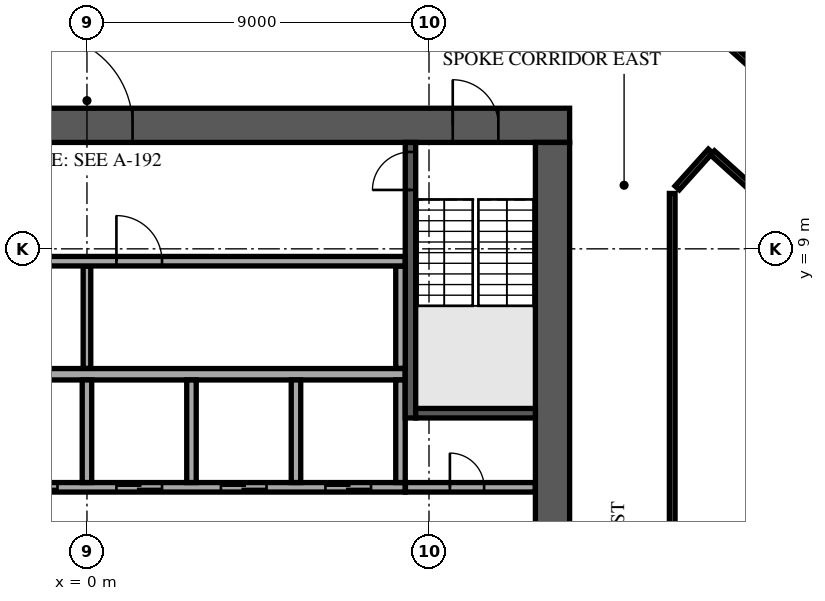
"""IFC4 building model, lengths in metres.
Left out: names, types, materials, properties, quantities, classifications, styles, units other than length and angle.
Written with IfcOpenShell. Run it as: python <this file> out.ifc"""

import sys

from ifc_helpers import new_model, si_unit, direction, frame, frame_2d, origin, place, context, subcontext, project, spatial, rectangle, extrude, element, fill, save


model = new_model("IFC4")
c1 = context("Model", 3, precision=1e-05, world=origin(), true_north=direction((0.0, 1.0)))
c2 = subcontext(c1, "Body", "Model", "MODEL_VIEW")
j1 = project(units=[si_unit("LENGTHUNIT", "METRE"), si_unit("PLANEANGLEUNIT", "RADIAN")], contexts=[c1])
p1 = place(None, origin())
s1 = spatial("IfcSite", under=j1, at=p1, CompositionType="ELEMENT")
p2 = place(p1, origin())
s2 = spatial("IfcBuilding", under=s1, at=p2, CompositionType="ELEMENT")
p3 = place(p2, frame((0.0, 0.0, 217.3)))
s3 = spatial("IfcBuildingStorey", under=s2, at=p3, CompositionType="ELEMENT", Elevation=217.3)
p4 = place(p3, frame((-12.7, 12.25, 0.0), z_axis=(0.0, 0.0, 1.0), x_axis=(1.0, 0.0, 0.0)))
e1 = element("IfcWall", 1, at=p4, inside=s3, PredefinedType="SHEAR", context=c2, shape_type="SweptSolid", body=[
    extrude(rectangle(XDim=25.4, YDim=0.9, at=frame_2d((12.7, 0.0))), origin(), (0.0, 0.0, 1.0), 3.62),
])
p5 = place(p4, frame((11.5, 0.0, 0.0)))
e2 = element("IfcOpeningElement", 2, at=p5, cuts=e1, PredefinedType="OPENING", context=c2, shape_type="SweptSolid", body=[
    extrude(rectangle(XDim=2.4, YDim=2.4, at=frame_2d((1.2, 1.2))), frame((0.0, 0.46, 0.0), z_axis=(0.0, -1.0, 0.0), x_axis=(1.0, 0.0, 0.0)), (0.0, 0.0, 1.0), 0.92),
])
p6 = place(p4, frame((22.325, 0.0, 0.0)))
e3 = element("IfcOpeningElement", 3, at=p6, cuts=e1, PredefinedType="OPENING", context=c2, shape_type="SweptSolid", body=[
    extrude(rectangle(XDim=1.2, YDim=2.1, at=frame_2d((0.6, 1.05))), frame((0.0, 0.46, 0.0), z_axis=(0.0, -1.0, 0.0), x_axis=(1.0, 0.0, 0.0)), (0.0, 0.0, 1.0), 0.92),
])
p7 = place(p4, frame((1.3, 0.0, 0.0)))
e4 = element("IfcOpeningElement", 4, at=p7, cuts=e1, PredefinedType="OPENING", context=c2, shape_type="SweptSolid", body=[
    extrude(rectangle(XDim=1.0, YDim=2.1, at=frame_2d((0.5, 1.05))), frame((0.0, 0.46, 0.0), z_axis=(0.0, -1.0, 0.0), x_axis=(1.0, 0.0, 0.0)), (0.0, 0.0, 1.0), 0.92),
])
p8 = place(p3, frame((12.25, -11.8, 0.0), z_axis=(0.0, 0.0, 1.0), x_axis=(0.0, 1.0, 0.0)))
e5 = element("IfcWall", 5, at=p8, inside=s3, PredefinedType="SHEAR", context=c2, shape_type="SweptSolid", body=[
    extrude(rectangle(XDim=23.6, YDim=0.9, at=frame_2d((11.8, 0.0))), origin(), (0.0, 0.0, 1.0), 3.62),
])
p9 = place(p8, frame((10.6, 0.0, 0.0)))
e6 = element("IfcOpeningElement", 6, at=p9, cuts=e5, PredefinedType="OPENING", context=c2, shape_type="SweptSolid", body=[
    extrude(rectangle(XDim=2.4, YDim=2.4, at=frame_2d((1.2, 1.2))), frame((0.0, 0.46, 0.0), z_axis=(0.0, -1.0, 0.0), x_axis=(1.0, 0.0, 0.0)), (0.0, 0.0, 1.0), 0.92),
])
p10 = place(p3, frame((-8.375, 5.7, 0.0), z_axis=(0.0, 0.0, 1.0), x_axis=(1.0, 0.0, 0.0)))
e7 = element("IfcWall", 7, at=p10, inside=s3, PredefinedType="SOLIDWALL", context=c2, shape_type="SweptSolid", body=[
    extrude(rectangle(XDim=16.75, YDim=0.3, at=frame_2d((8.375, 0.0))), origin(), (0.0, 0.0, 1.0), 3.62),
])
p11 = place(p3, frame((-8.375, 2.725, 0.0), z_axis=(0.0, 0.0, 1.0), x_axis=(1.0, 0.0, 0.0)))
e8 = element("IfcWall", 8, at=p11, inside=s3, PredefinedType="SOLIDWALL", context=c2, shape_type="SweptSolid", body=[
    extrude(rectangle(XDim=16.75, YDim=0.25, at=frame_2d((8.375, 0.0))), origin(), (0.0, 0.0, 1.0), 3.62),
])
p12 = place(p11, frame((0.9, 0.0, 0.0)))
e9 = element("IfcOpeningElement", 9, at=p12, cuts=e8, PredefinedType="OPENING", context=c2, shape_type="SweptSolid", body=[
    extrude(rectangle(XDim=1.2, YDim=2.1, at=frame_2d((0.6, 1.05))), frame((0.0, 0.135, 0.0), z_axis=(0.0, -1.0, 0.0), x_axis=(1.0, 0.0, 0.0)), (0.0, 0.0, 1.0), 0.27),
])
p13 = place(p11, frame((3.65, 0.0, 0.0)))
e10 = element("IfcOpeningElement", 10, at=p13, cuts=e8, PredefinedType="OPENING", context=c2, shape_type="SweptSolid", body=[
    extrude(rectangle(XDim=1.2, YDim=2.1, at=frame_2d((0.6, 1.05))), frame((0.0, 0.135, 0.0), z_axis=(0.0, -1.0, 0.0), x_axis=(1.0, 0.0, 0.0)), (0.0, 0.0, 1.0), 0.27),
])
p14 = place(p11, frame((6.4, 0.0, 0.0)))
e11 = element("IfcOpeningElement", 11, at=p14, cuts=e8, PredefinedType="OPENING", context=c2, shape_type="SweptSolid", body=[
    extrude(rectangle(XDim=1.2, YDim=2.1, at=frame_2d((0.6, 1.05))), frame((0.0, 0.135, 0.0), z_axis=(0.0, -1.0, 0.0), x_axis=(1.0, 0.0, 0.0)), (0.0, 0.0, 1.0), 0.27),
])
p15 = place(p11, frame((9.15, 0.0, 0.0)))
e12 = element("IfcOpeningElement", 12, at=p15, cuts=e8, PredefinedType="OPENING", context=c2, shape_type="SweptSolid", body=[
    extrude(rectangle(XDim=1.2, YDim=2.1, at=frame_2d((0.6, 1.05))), frame((0.0, 0.135, 0.0), z_axis=(0.0, -1.0, 0.0), x_axis=(1.0, 0.0, 0.0)), (0.0, 0.0, 1.0), 0.27),
])
p16 = place(p11, frame((11.9, 0.0, 0.0)))
e13 = element("IfcOpeningElement", 13, at=p16, cuts=e8, PredefinedType="OPENING", context=c2, shape_type="SweptSolid", body=[
    extrude(rectangle(XDim=1.2, YDim=2.1, at=frame_2d((0.6, 1.05))), frame((0.0, 0.135, 0.0), z_axis=(0.0, -1.0, 0.0), x_axis=(1.0, 0.0, 0.0)), (0.0, 0.0, 1.0), 0.27),
])
p17 = place(p11, frame((14.65, 0.0, 0.0)))
e14 = element("IfcOpeningElement", 14, at=p17, cuts=e8, PredefinedType="OPENING", context=c2, shape_type="SweptSolid", body=[
    extrude(rectangle(XDim=1.2, YDim=2.1, at=frame_2d((0.6, 1.05))), frame((0.0, 0.135, 0.0), z_axis=(0.0, -1.0, 0.0), x_axis=(1.0, 0.0, 0.0)), (0.0, 0.0, 1.0), 0.27),
])
for number, where, z_axis, x_axis in (
    (15, (0.0, 2.85, 0.0), (0.0, 0.0, 1.0), (0.0, 1.0, 0.0)),
    (16, (2.75, 2.85, 0.0), (0.0, 0.0, 1.0), (0.0, 1.0, 0.0)),
    (17, (5.5, 2.85, 0.0), (0.0, 0.0, 1.0), (0.0, 1.0, 0.0)),
    (18, (8.25, 2.85, 0.0), (0.0, 0.0, 1.0), (0.0, 1.0, 0.0)),
):
    element("IfcWall", number, at=place(p3, frame(where, z_axis=z_axis, x_axis=x_axis)), inside=s3, PredefinedType="SOLIDWALL", context=c2, shape_type="SweptSolid", body=[
        extrude(rectangle(XDim=2.7, YDim=0.25, at=frame_2d((1.35, 0.0))), origin(), (0.0, 0.0, 1.0), 3.62),
    ])
p18 = place(p3, frame((8.512, 4.55, 0.0), z_axis=(0.0, 0.0, 1.0), x_axis=(0.0, 1.0, 0.0)))
e19 = element("IfcWall", 19, at=p18, inside=s3, PredefinedType="SOLIDWALL", context=c2, shape_type="SweptSolid", body=[
    extrude(rectangle(XDim=7.25, YDim=0.275, at=frame_2d((3.625, 0.0))), origin(), (0.0, 0.0, 1.0), 3.62),
])
p19 = place(p18, frame((6.0, 0.0, 0.0)))
e20 = element("IfcOpeningElement", 20, at=p19, cuts=e19, PredefinedType="OPENING", context=c2, shape_type="SweptSolid", body=[
    extrude(rectangle(XDim=1.0, YDim=2.1, at=frame_2d((0.5, 1.05))), frame((0.0, 0.147, 0.0), z_axis=(0.0, -1.0, 0.0), x_axis=(1.0, 0.0, 0.0)), (0.0, 0.0, 1.0), 0.295),
])
p20 = place(p3, frame((8.65, 4.675, 0.0), z_axis=(0.0, 0.0, 1.0), x_axis=(1.0, 0.0, 0.0)))
e21 = element("IfcWall", 21, at=p20, inside=s3, PredefinedType="SOLIDWALL", context=c2, shape_type="SweptSolid", body=[
    extrude(rectangle(XDim=3.15, YDim=0.25, at=frame_2d((1.575, 0.0))), origin(), (0.0, 0.0, 1.0), 3.62),
])
p21 = place(p3, frame((8.38, 2.725, 0.0), z_axis=(0.0, 0.0, 1.0), x_axis=(1.0, 0.0, 0.0)))
e22 = element("IfcWall", 22, at=p21, inside=s3, PredefinedType="PARTITIONING", context=c2, shape_type="SweptSolid", body=[
    extrude(rectangle(XDim=3.415, YDim=0.25, at=frame_2d((1.708, 0.0))), origin(), (0.0, 0.0, 1.0), 3.62),
])
p22 = place(p21, frame((1.17, 0.0, 0.0)))
e23 = element("IfcOpeningElement", 23, at=p22, cuts=e22, PredefinedType="OPENING", context=c2, shape_type="SweptSolid", body=[
    extrude(rectangle(XDim=0.9, YDim=2.1, at=frame_2d((0.45, 1.05))), frame((0.0, 0.135, 0.0), z_axis=(0.0, -1.0, 0.0), x_axis=(1.0, 0.0, 0.0)), (0.0, 0.0, 1.0), 0.27),
])
p23 = place(p3, frame((0.0, 5.855, 0.0), z_axis=(0.0, 0.0, 1.0), x_axis=(0.0, 1.0, 0.0)))
e24 = element("IfcWall", 24, at=p23, inside=s3, PredefinedType="PARTITIONING", context=c2, shape_type="SweptSolid", body=[
    extrude(rectangle(XDim=2.69, YDim=0.2, at=frame_2d((1.345, 0.0))), origin(), (0.0, 0.0, 1.0), 3.62),
])
p24 = place(p3, frame((8.25, 5.855, 0.0), z_axis=(0.0, 0.0, 1.0), x_axis=(0.0, 1.0, 0.0)))
e25 = element("IfcWall", 25, at=p24, inside=s3, PredefinedType="PARTITIONING", context=c2, shape_type="SweptSolid", body=[
    extrude(rectangle(XDim=2.69, YDim=0.25, at=frame_2d((1.345, 0.0))), origin(), (0.0, 0.0, 1.0), 3.62),
])
p25 = place(p3, frame((-8.35, 8.675, 0.0), z_axis=(0.0, 0.0, 1.0), x_axis=(1.0, 0.0, 0.0)))
e26 = element("IfcWall", 26, at=p25, inside=s3, PredefinedType="PARTITIONING", context=c2, shape_type="SweptSolid", body=[
    extrude(rectangle(XDim=16.72, YDim=0.25, at=frame_2d((8.36, 0.0))), origin(), (0.0, 0.0, 1.0), 3.62),
])
p26 = place(p25, frame((0.875, 0.0, 0.0)))
e27 = element("IfcOpeningElement", 27, at=p26, cuts=e26, PredefinedType="OPENING", context=c2, shape_type="SweptSolid", body=[
    extrude(rectangle(XDim=1.2, YDim=2.1, at=frame_2d((0.6, 1.05))), frame((0.0, 0.135, 0.0), z_axis=(0.0, -1.0, 0.0), x_axis=(1.0, 0.0, 0.0)), (0.0, 0.0, 1.0), 0.27),
])
p27 = place(p25, frame((9.125, 0.0, 0.0)))
e28 = element("IfcOpeningElement", 28, at=p27, cuts=e26, PredefinedType="OPENING", context=c2, shape_type="SweptSolid", body=[
    extrude(rectangle(XDim=1.2, YDim=2.1, at=frame_2d((0.6, 1.05))), frame((0.0, 0.135, 0.0), z_axis=(0.0, -1.0, 0.0), x_axis=(1.0, 0.0, 0.0)), (0.0, 0.0, 1.0), 0.27),
])
p28 = place(p3, frame((1.962, -34.735, 0.0), z_axis=(0.0, 0.0, 1.0), x_axis=(0.669133181838, 0.743142506497, 0.0)))
e29 = element("IfcWall", 29, at=p28, inside=s3, PredefinedType="STANDARD", context=c2, shape_type="SweptSolid", body=[
    extrude(rectangle(XDim=49.0, YDim=0.6, at=frame_2d((24.5, 0.0))), origin(), (0.0, 0.0, 1.0), 3.62),
])
p29 = place(p28, frame((1.227, 0.0, 0.9)))
e30 = element("IfcOpeningElement", 30, at=p29, cuts=e29, PredefinedType="OPENING", context=c2, shape_type="SweptSolid", body=[
    extrude(rectangle(XDim=2.0, YDim=2.1, at=frame_2d((1.0, 1.05))), frame((0.0, 0.31, 0.0), z_axis=(0.0, -1.0, 0.0), x_axis=(1.0, 0.0, 0.0)), (0.0, 0.0, 1.0), 0.62),
])
p30 = place(p28, frame((5.682, 0.0, 0.9)))
e31 = element("IfcOpeningElement", 31, at=p30, cuts=e29, PredefinedType="OPENING", context=c2, shape_type="SweptSolid", body=[
    extrude(rectangle(XDim=2.0, YDim=2.1, at=frame_2d((1.0, 1.05))), frame((0.0, 0.31, 0.0), z_axis=(0.0, -1.0, 0.0), x_axis=(1.0, 0.0, 0.0)), (0.0, 0.0, 1.0), 0.62),
])
p31 = place(p28, frame((10.136, 0.0, 0.9)))
e32 = element("IfcOpeningElement", 32, at=p31, cuts=e29, PredefinedType="OPENING", context=c2, shape_type="SweptSolid", body=[
    extrude(rectangle(XDim=2.0, YDim=2.1, at=frame_2d((1.0, 1.05))), frame((0.0, 0.31, 0.0), z_axis=(0.0, -1.0, 0.0), x_axis=(1.0, 0.0, 0.0)), (0.0, 0.0, 1.0), 0.62),
])
p32 = place(p28, frame((14.591, 0.0, 0.9)))
e33 = element("IfcOpeningElement", 33, at=p32, cuts=e29, PredefinedType="OPENING", context=c2, shape_type="SweptSolid", body=[
    extrude(rectangle(XDim=2.0, YDim=2.1, at=frame_2d((1.0, 1.05))), frame((0.0, 0.31, 0.0), z_axis=(0.0, -1.0, 0.0), x_axis=(1.0, 0.0, 0.0)), (0.0, 0.0, 1.0), 0.62),
])
p33 = place(p28, frame((19.045, 0.0, 0.9)))
e34 = element("IfcOpeningElement", 34, at=p33, cuts=e29, PredefinedType="OPENING", context=c2, shape_type="SweptSolid", body=[
    extrude(rectangle(XDim=2.0, YDim=2.1, at=frame_2d((1.0, 1.05))), frame((0.0, 0.31, 0.0), z_axis=(0.0, -1.0, 0.0), x_axis=(1.0, 0.0, 0.0)), (0.0, 0.0, 1.0), 0.62),
])
p34 = place(p28, frame((23.5, 0.0, 0.9)))
e35 = element("IfcOpeningElement", 35, at=p34, cuts=e29, PredefinedType="OPENING", context=c2, shape_type="SweptSolid", body=[
    extrude(rectangle(XDim=2.0, YDim=2.1, at=frame_2d((1.0, 1.05))), frame((0.0, 0.31, 0.0), z_axis=(0.0, -1.0, 0.0), x_axis=(1.0, 0.0, 0.0)), (0.0, 0.0, 1.0), 0.62),
])
p35 = place(p28, frame((27.955, 0.0, 0.9)))
e36 = element("IfcOpeningElement", 36, at=p35, cuts=e29, PredefinedType="OPENING", context=c2, shape_type="SweptSolid", body=[
    extrude(rectangle(XDim=2.0, YDim=2.1, at=frame_2d((1.0, 1.05))), frame((0.0, 0.31, 0.0), z_axis=(0.0, -1.0, 0.0), x_axis=(1.0, 0.0, 0.0)), (0.0, 0.0, 1.0), 0.62),
])
p36 = place(p28, frame((32.409, 0.0, 0.9)))
e37 = element("IfcOpeningElement", 37, at=p36, cuts=e29, PredefinedType="OPENING", context=c2, shape_type="SweptSolid", body=[
    extrude(rectangle(XDim=2.0, YDim=2.1, at=frame_2d((1.0, 1.05))), frame((0.0, 0.31, 0.0), z_axis=(0.0, -1.0, 0.0), x_axis=(1.0, 0.0, 0.0)), (0.0, 0.0, 1.0), 0.62),
])
p37 = place(p28, frame((36.864, 0.0, 0.9)))
e38 = element("IfcOpeningElement", 38, at=p37, cuts=e29, PredefinedType="OPENING", context=c2, shape_type="SweptSolid", body=[
    extrude(rectangle(XDim=2.0, YDim=2.1, at=frame_2d((1.0, 1.05))), frame((0.0, 0.31, 0.0), z_axis=(0.0, -1.0, 0.0), x_axis=(1.0, 0.0, 0.0)), (0.0, 0.0, 1.0), 0.62),
])
p38 = place(p28, frame((41.318, 0.0, 0.9)))
e39 = element("IfcOpeningElement", 39, at=p38, cuts=e29, PredefinedType="OPENING", context=c2, shape_type="SweptSolid", body=[
    extrude(rectangle(XDim=2.0, YDim=2.1, at=frame_2d((1.0, 1.05))), frame((0.0, 0.31, 0.0), z_axis=(0.0, -1.0, 0.0), x_axis=(1.0, 0.0, 0.0)), (0.0, 0.0, 1.0), 0.62),
])
p39 = place(p28, frame((45.773, 0.0, 0.9)))
e40 = element("IfcOpeningElement", 40, at=p39, cuts=e29, PredefinedType="OPENING", context=c2, shape_type="SweptSolid", body=[
    extrude(rectangle(XDim=2.0, YDim=2.1, at=frame_2d((1.0, 1.05))), frame((0.0, 0.31, 0.0), z_axis=(0.0, -1.0, 0.0), x_axis=(1.0, 0.0, 0.0)), (0.0, 0.0, 1.0), 0.62),
])
p40 = place(p3, frame((34.365, 9.023, 0.0), z_axis=(0.0, 0.0, 1.0), x_axis=(-0.743146896498, 0.66912830625, 0.0)))
e41 = element("IfcWall", 41, at=p40, inside=s3, PredefinedType="STANDARD", context=c2, shape_type="SweptSolid", body=[
    extrude(rectangle(XDim=39.0, YDim=0.6, at=frame_2d((19.5, 0.0))), origin(), (0.0, 0.0, 1.0), 3.62),
])
p41 = place(p40, frame((1.217, 0.0, 0.9)))
e42 = element("IfcOpeningElement", 42, at=p41, cuts=e41, PredefinedType="OPENING", context=c2, shape_type="SweptSolid", body=[
    extrude(rectangle(XDim=1.9, YDim=2.1, at=frame_2d((0.95, 1.05))), frame((0.0, 0.31, 0.0), z_axis=(0.0, -1.0, 0.0), x_axis=(1.0, 0.0, 0.0)), (0.0, 0.0, 1.0), 0.62),
])
p42 = place(p40, frame((5.55, 0.0, 0.9)))
e43 = element("IfcOpeningElement", 43, at=p42, cuts=e41, PredefinedType="OPENING", context=c2, shape_type="SweptSolid", body=[
    extrude(rectangle(XDim=1.9, YDim=2.1, at=frame_2d((0.95, 1.05))), frame((0.0, 0.31, 0.0), z_axis=(0.0, -1.0, 0.0), x_axis=(1.0, 0.0, 0.0)), (0.0, 0.0, 1.0), 0.62),
])
p43 = place(p40, frame((9.883, 0.0, 0.9)))
e44 = element("IfcOpeningElement", 44, at=p43, cuts=e41, PredefinedType="OPENING", context=c2, shape_type="SweptSolid", body=[
    extrude(rectangle(XDim=1.9, YDim=2.1, at=frame_2d((0.95, 1.05))), frame((0.0, 0.31, 0.0), z_axis=(0.0, -1.0, 0.0), x_axis=(1.0, 0.0, 0.0)), (0.0, 0.0, 1.0), 0.62),
])
p44 = place(p40, frame((14.217, 0.0, 0.9)))
e45 = element("IfcOpeningElement", 45, at=p44, cuts=e41, PredefinedType="OPENING", context=c2, shape_type="SweptSolid", body=[
    extrude(rectangle(XDim=1.9, YDim=2.1, at=frame_2d((0.95, 1.05))), frame((0.0, 0.31, 0.0), z_axis=(0.0, -1.0, 0.0), x_axis=(1.0, 0.0, 0.0)), (0.0, 0.0, 1.0), 0.62),
])
p45 = place(p40, frame((18.55, 0.0, 0.9)))
e46 = element("IfcOpeningElement", 46, at=p45, cuts=e41, PredefinedType="OPENING", context=c2, shape_type="SweptSolid", body=[
    extrude(rectangle(XDim=1.9, YDim=2.1, at=frame_2d((0.95, 1.05))), frame((0.0, 0.31, 0.0), z_axis=(0.0, -1.0, 0.0), x_axis=(1.0, 0.0, 0.0)), (0.0, 0.0, 1.0), 0.62),
])
p46 = place(p40, frame((22.883, 0.0, 0.9)))
e47 = element("IfcOpeningElement", 47, at=p46, cuts=e41, PredefinedType="OPENING", context=c2, shape_type="SweptSolid", body=[
    extrude(rectangle(XDim=1.9, YDim=2.1, at=frame_2d((0.95, 1.05))), frame((0.0, 0.31, 0.0), z_axis=(0.0, -1.0, 0.0), x_axis=(1.0, 0.0, 0.0)), (0.0, 0.0, 1.0), 0.62),
])
p47 = place(p40, frame((27.217, 0.0, 0.9)))
e48 = element("IfcOpeningElement", 48, at=p47, cuts=e41, PredefinedType="OPENING", context=c2, shape_type="SweptSolid", body=[
    extrude(rectangle(XDim=1.9, YDim=2.1, at=frame_2d((0.95, 1.05))), frame((0.0, 0.31, 0.0), z_axis=(0.0, -1.0, 0.0), x_axis=(1.0, 0.0, 0.0)), (0.0, 0.0, 1.0), 0.62),
])
p48 = place(p40, frame((31.55, 0.0, 0.9)))
e49 = element("IfcOpeningElement", 49, at=p48, cuts=e41, PredefinedType="OPENING", context=c2, shape_type="SweptSolid", body=[
    extrude(rectangle(XDim=1.9, YDim=2.1, at=frame_2d((0.95, 1.05))), frame((0.0, 0.31, 0.0), z_axis=(0.0, -1.0, 0.0), x_axis=(1.0, 0.0, 0.0)), (0.0, 0.0, 1.0), 0.62),
])
p49 = place(p40, frame((35.883, 0.0, 0.9)))
e50 = element("IfcOpeningElement", 50, at=p49, cuts=e41, PredefinedType="OPENING", context=c2, shape_type="SweptSolid", body=[
    extrude(rectangle(XDim=1.9, YDim=2.1, at=frame_2d((0.95, 1.05))), frame((0.0, 0.31, 0.0), z_axis=(0.0, -1.0, 0.0), x_axis=(1.0, 0.0, 0.0)), (0.0, 0.0, 1.0), 0.62),
])
p50 = place(p3, frame((5.128, 24.958, 0.0), z_axis=(0.0, 0.0, 1.0), x_axis=(0.743144813636, -0.66913061951, 0.0)))
e51 = element("IfcWall", 51, at=p50, inside=s3, PredefinedType="PARTITIONING", context=c2, shape_type="SweptSolid", body=[
    extrude(rectangle(XDim=25.854, YDim=0.15, at=frame_2d((12.927, 0.0))), origin(), (0.0, 0.0, 1.0), 3.17),
])
p51 = place(p50, frame((8.946, 0.0, 0.0)))
e52 = element("IfcOpeningElement", 52, at=p51, cuts=e51, PredefinedType="OPENING", context=c2, shape_type="SweptSolid", body=[
    extrude(rectangle(XDim=1.0, YDim=2.1, at=frame_2d((0.5, 1.05))), frame((0.0, 0.085, 0.0), z_axis=(0.0, -1.0, 0.0), x_axis=(1.0, 0.0, 0.0)), (0.0, 0.0, 1.0), 0.17),
])
p52 = place(p50, frame((20.29, 0.0, 0.0)))
e53 = element("IfcOpeningElement", 53, at=p52, cuts=e51, PredefinedType="OPENING", context=c2, shape_type="SweptSolid", body=[
    extrude(rectangle(XDim=1.8, YDim=2.1, at=frame_2d((0.9, 1.05))), frame((0.0, 0.085, 0.0), z_axis=(0.0, -1.0, 0.0), x_axis=(1.0, 0.0, 0.0)), (0.0, 0.0, 1.0), 0.17),
])
p53 = place(p3, frame((15.4, -7.851, 0.0), z_axis=(0.0, 0.0, 1.0), x_axis=(0.0, 1.0, 0.0)))
e54 = element("IfcWall", 54, at=p53, inside=s3, PredefinedType="PARTITIONING", context=c2, shape_type="SweptSolid", body=[
    extrude(rectangle(XDim=18.309, YDim=0.15, at=frame_2d((9.154, 0.0))), origin(), (0.0, 0.0, 1.0), 3.17),
])
p54 = place(p3, frame((15.531, 10.603, 0.0), z_axis=(0.0, 0.0, 1.0), x_axis=(0.669233140763, 0.743052490275, 0.0)))
e55 = element("IfcWall", 55, at=p54, inside=s3, PredefinedType="PARTITIONING", context=c2, shape_type="SweptSolid", body=[
    extrude(rectangle(XDim=1.306, YDim=0.15, at=frame_2d((0.653, 0.0))), origin(), (0.0, 0.0, 1.0), 3.17),
])
p55 = place(p3, frame((16.461, 11.524, 0.0), z_axis=(0.0, 0.0, 1.0), x_axis=(0.743193483902, -0.669076561752, 0.0)))
e56 = element("IfcWall", 56, at=p55, inside=s3, PredefinedType="PARTITIONING", context=c2, shape_type="SweptSolid", body=[
    extrude(rectangle(XDim=8.442, YDim=0.15, at=frame_2d((4.221, 0.0))), origin(), (0.0, 0.0, 1.0), 3.17),
])
p56 = place(p5, origin())
e57 = element("IfcDoor", 57, at=p56, inside=s3, OperationType="SINGLE_SWING_LEFT", PredefinedType="DOOR", context=c2, shape_type="SweptSolid", body=[
    extrude(rectangle(XDim=2.4, YDim=2.4, at=frame_2d((1.2, 1.2))), frame((0.0, 0.025, 0.0), z_axis=(0.0, -1.0, 0.0), x_axis=(1.0, 0.0, 0.0)), (0.0, 0.0, 1.0), 0.05),
])
fill(e2, e57)
p57 = place(p6, origin())
e58 = element("IfcDoor", 58, at=p57, inside=s3, OperationType="SINGLE_SWING_LEFT", PredefinedType="DOOR", context=c2, shape_type="SweptSolid", body=[
    extrude(rectangle(XDim=1.2, YDim=2.1, at=frame_2d((0.6, 1.05))), frame((0.0, 0.025, 0.0), z_axis=(0.0, -1.0, 0.0), x_axis=(1.0, 0.0, 0.0)), (0.0, 0.0, 1.0), 0.05),
])
fill(e3, e58)
p58 = place(p14, origin())
e59 = element("IfcDoor", 59, at=p58, inside=s3, OperationType="DOUBLE_DOOR_SLIDING", PredefinedType="DOOR", context=c2, shape_type="SweptSolid", body=[
    extrude(rectangle(XDim=1.2, YDim=2.1, at=frame_2d((0.6, 1.05))), frame((0.0, 0.025, 0.0), z_axis=(0.0, -1.0, 0.0), x_axis=(1.0, 0.0, 0.0)), (0.0, 0.0, 1.0), 0.05),
])
fill(e11, e59)
p59 = place(p15, origin())
e60 = element("IfcDoor", 60, at=p59, inside=s3, OperationType="DOUBLE_DOOR_SLIDING", PredefinedType="DOOR", context=c2, shape_type="SweptSolid", body=[
    extrude(rectangle(XDim=1.2, YDim=2.1, at=frame_2d((0.6, 1.05))), frame((0.0, 0.025, 0.0), z_axis=(0.0, -1.0, 0.0), x_axis=(1.0, 0.0, 0.0)), (0.0, 0.0, 1.0), 0.05),
])
fill(e12, e60)
p60 = place(p16, origin())
e61 = element("IfcDoor", 61, at=p60, inside=s3, OperationType="DOUBLE_DOOR_SLIDING", PredefinedType="DOOR", context=c2, shape_type="SweptSolid", body=[
    extrude(rectangle(XDim=1.2, YDim=2.1, at=frame_2d((0.6, 1.05))), frame((0.0, 0.025, 0.0), z_axis=(0.0, -1.0, 0.0), x_axis=(1.0, 0.0, 0.0)), (0.0, 0.0, 1.0), 0.05),
])
fill(e13, e61)
p61 = place(p17, origin())
e62 = element("IfcDoor", 62, at=p61, inside=s3, OperationType="DOUBLE_DOOR_SLIDING", PredefinedType="DOOR", context=c2, shape_type="SweptSolid", body=[
    extrude(rectangle(XDim=1.2, YDim=2.1, at=frame_2d((0.6, 1.05))), frame((0.0, 0.025, 0.0), z_axis=(0.0, -1.0, 0.0), x_axis=(1.0, 0.0, 0.0)), (0.0, 0.0, 1.0), 0.05),
])
fill(e14, e62)
p62 = place(p19, origin())
e63 = element("IfcDoor", 63, at=p62, inside=s3, OperationType="SINGLE_SWING_LEFT", PredefinedType="DOOR", context=c2, shape_type="SweptSolid", body=[
    extrude(rectangle(XDim=1.0, YDim=2.1, at=frame_2d((0.5, 1.05))), frame((0.0, 0.025, 0.0), z_axis=(0.0, -1.0, 0.0), x_axis=(1.0, 0.0, 0.0)), (0.0, 0.0, 1.0), 0.05),
])
fill(e20, e63)
p63 = place(p22, origin())
e64 = element("IfcDoor", 64, at=p63, inside=s3, OperationType="SINGLE_SWING_RIGHT", PredefinedType="DOOR", context=c2, shape_type="SweptSolid", body=[
    extrude(rectangle(XDim=0.9, YDim=2.1, at=frame_2d((0.45, 1.05))), frame((0.0, 0.025, 0.0), z_axis=(0.0, -1.0, 0.0), x_axis=(1.0, 0.0, 0.0)), (0.0, 0.0, 1.0), 0.05),
])
fill(e23, e64)
p64 = place(p27, origin())
e65 = element("IfcDoor", 65, at=p64, inside=s3, OperationType="SINGLE_SWING_LEFT", PredefinedType="DOOR", context=c2, shape_type="SweptSolid", body=[
    extrude(rectangle(XDim=1.2, YDim=2.1, at=frame_2d((0.6, 1.05))), frame((0.0, 0.025, 0.0), z_axis=(0.0, -1.0, 0.0), x_axis=(1.0, 0.0, 0.0)), (0.0, 0.0, 1.0), 0.05),
])
fill(e28, e65)
save(model, sys.argv[1])
